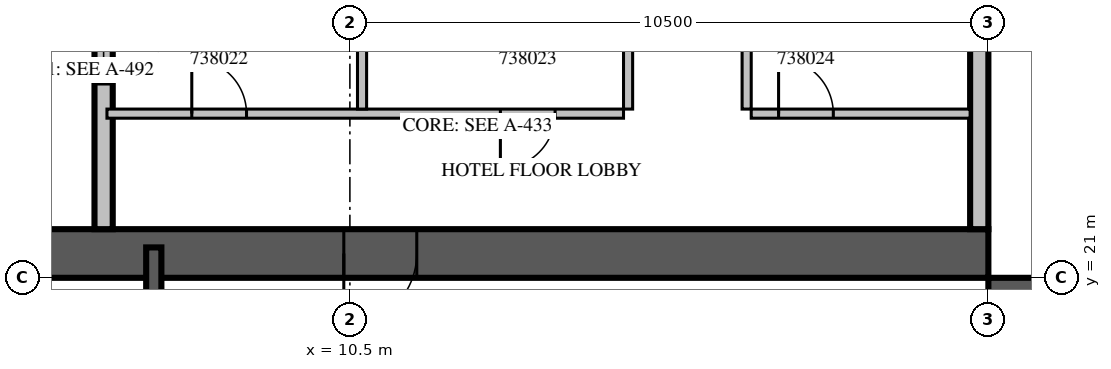
"""IFC4 building model, lengths in metres.
Left out: names, types, materials, properties, quantities, classifications, styles, units other than length and angle.
Written with IfcOpenShell. Run it as: python <this file> out.ifc"""

import sys

from ifc_helpers import new_model, si_unit, direction, frame, frame_2d, origin, place, context, subcontext, project, spatial, rectangle, extrude, source, transform, mapped, element, fill, save


model = new_model("IFC4")
c1 = context("Model", 3, precision=1e-05, world=origin(), true_north=direction((0.0, 1.0)))
c2 = subcontext(c1, "Body", "Model", "MODEL_VIEW")
j1 = project(units=[si_unit("LENGTHUNIT", "METRE"), si_unit("PLANEANGLEUNIT", "RADIAN")], contexts=[c1])
p1 = place(None, origin())
s1 = spatial("IfcSite", under=j1, at=p1, CompositionType="ELEMENT")
p2 = place(p1, origin())
s2 = spatial("IfcBuilding", under=s1, at=p2, CompositionType="ELEMENT")
p3 = place(p2, frame((0.0, 0.0, 177.8)))
s3 = spatial("IfcBuildingStorey", under=s2, at=p3, CompositionType="ELEMENT", Elevation=177.8)
p4 = place(p3, frame((21.4, 4.2, 0.0), z_axis=(0.0, 0.0, 1.0), x_axis=(0.0, 1.0, 0.0)))
e1 = element("IfcWall", 1, at=p4, inside=s3, PredefinedType="SHEAR", context=c2, shape_type="SweptSolid", body=[
    extrude(rectangle(XDim=16.8, YDim=0.8, at=frame_2d((8.4, 0.0))), origin(), (0.0, 0.0, 1.0), 3.8),
])
p5 = place(p4, frame((4.2, 0.0, 0.0)))
e2 = element("IfcOpeningElement", 2, at=p5, cuts=e1, PredefinedType="OPENING", context=c2, shape_type="SweptSolid", body=[
    extrude(rectangle(XDim=2.2, YDim=2.1, at=frame_2d((1.1, 1.05))), frame((0.0, 0.41, 0.0), z_axis=(0.0, -1.0, 0.0), x_axis=(1.0, 0.0, 0.0)), (0.0, 0.0, 1.0), 0.82),
])
m1 = source(origin(), c2, "Body", "SweptSolid", [
    extrude(rectangle(XDim=1.2, YDim=2.1, at=frame_2d((0.6, 1.05))), frame((0.0, 0.41, 0.0), z_axis=(0.0, -1.0, 0.0), x_axis=(1.0, 0.0, 0.0)), (0.0, 0.0, 1.0), 0.82),
])
p6 = place(p4, frame((14.7, 0.0, 0.0)))
e3 = element("IfcOpeningElement", 3, at=p6, cuts=e1, PredefinedType="OPENING", context=c2, shape_type="MappedRepresentation", body=[
    mapped(m1, transform((0.0, 0.0, 0.0), scale=1.0)),
])
m2 = source(origin(), c2, "Body", "SweptSolid", [
    extrude(rectangle(XDim=16.8, YDim=0.8, at=frame_2d((8.4, 0.0))), origin(), (0.0, 0.0, 1.0), 3.8),
])
p7 = place(p3, frame((4.2, 21.4, 0.0), z_axis=(0.0, 0.0, 1.0), x_axis=(1.0, 0.0, 0.0)))
e4 = element("IfcWall", 4, at=p7, inside=s3, PredefinedType="SHEAR", context=c2, shape_type="MappedRepresentation", body=[
    mapped(m2, transform((0.0, 0.0, 0.0), scale=1.0)),
])
p8 = place(p7, frame((6.2, 0.0, 0.0)))
e5 = element("IfcOpeningElement", 5, at=p8, cuts=e4, PredefinedType="OPENING", context=c2, shape_type="SweptSolid", body=[
    extrude(rectangle(XDim=1.2, YDim=2.1, at=frame_2d((0.6, 1.05))), frame((0.0, 0.41, 0.0), z_axis=(0.0, -1.0, 0.0), x_axis=(1.0, 0.0, 0.0)), (0.0, 0.0, 1.0), 0.82),
])
m3 = source(origin(), c2, "Body", "SweptSolid", [
    extrude(rectangle(XDim=7.15, YDim=0.3, at=frame_2d((3.575, 0.0))), origin(), (0.0, 0.0, 1.0), 3.4),
])
p9 = place(p3, frame((20.85, 21.8, 0.0), z_axis=(0.0, 0.0, 1.0), x_axis=(0.0, 1.0, 0.0)))
e6 = element("IfcWall", 6, at=p9, inside=s3, PredefinedType="STANDARD", context=c2, shape_type="MappedRepresentation", body=[
    mapped(m3, transform((0.0, 0.0, 0.0), scale=1.0)),
])
m4 = source(origin(), c2, "Body", "SweptSolid", [
    extrude(rectangle(XDim=3.0, YDim=2.3, at=frame_2d((1.5, 1.15))), frame((0.0, 0.16, 0.0), z_axis=(0.0, -1.0, 0.0), x_axis=(1.0, 0.0, 0.0)), (0.0, 0.0, 1.0), 0.32),
])
p10 = place(p9, frame((4.0, 0.0, 0.6)))
e7 = element("IfcOpeningElement", 7, at=p10, cuts=e6, PredefinedType="OPENING", context=c2, shape_type="MappedRepresentation", body=[
    mapped(m4, transform((0.0, 0.0, 0.0), scale=1.0)),
])
p11 = place(p3, frame((6.45, 38.4, 0.0), z_axis=(0.0, 0.0, 1.0), x_axis=(0.0, -1.0, 0.0)))
e8 = element("IfcWall", 8, at=p11, inside=s3, PredefinedType="STANDARD", context=c2, shape_type="SweptSolid", body=[
    extrude(rectangle(XDim=16.6, YDim=0.3, at=frame_2d((8.3, 0.0))), origin(), (0.0, 0.0, 1.0), 3.4),
])
m5 = source(origin(), c2, "Body", "SweptSolid", [
    extrude(rectangle(XDim=1.8, YDim=2.3, at=frame_2d((0.9, 1.15))), frame((0.0, 0.16, 0.0), z_axis=(0.0, -1.0, 0.0), x_axis=(1.0, 0.0, 0.0)), (0.0, 0.0, 1.0), 0.32),
])
p12 = place(p11, frame((1.15, 0.0, 0.6)))
e9 = element("IfcOpeningElement", 9, at=p12, cuts=e8, PredefinedType="OPENING", context=c2, shape_type="MappedRepresentation", body=[
    mapped(m5, transform((0.0, 0.0, 0.0), scale=1.0)),
])
p13 = place(p11, frame((5.162, 0.0, 0.6)))
e10 = element("IfcOpeningElement", 10, at=p13, cuts=e8, PredefinedType="OPENING", context=c2, shape_type="MappedRepresentation", body=[
    mapped(m5, transform((0.0, 0.0, 0.0), scale=1.0)),
])
p14 = place(p11, frame((9.438, 0.0, 0.6)))
e11 = element("IfcOpeningElement", 11, at=p14, cuts=e8, PredefinedType="OPENING", context=c2, shape_type="MappedRepresentation", body=[
    mapped(m5, transform((0.0, 0.0, 0.0), scale=1.0)),
])
m6 = source(origin(), c2, "Body", "SweptSolid", [
    extrude(rectangle(XDim=1.2, YDim=2.3, at=frame_2d((0.6, 1.15))), frame((0.0, 0.16, 0.0), z_axis=(0.0, -1.0, 0.0), x_axis=(1.0, 0.0, 0.0)), (0.0, 0.0, 1.0), 0.32),
])
p15 = place(p11, frame((13.012, 0.0, 0.6)))
e12 = element("IfcOpeningElement", 12, at=p15, cuts=e8, PredefinedType="OPENING", context=c2, shape_type="MappedRepresentation", body=[
    mapped(m6, transform((0.0, 0.0, 0.0), scale=1.0)),
])
p16 = place(p3, frame((7.275, 14.9, 0.0), z_axis=(0.0, 0.0, 1.0), x_axis=(0.0, 1.0, 0.0)))
e13 = element("IfcWall", 13, at=p16, inside=s3, PredefinedType="SOLIDWALL", context=c2, shape_type="SweptSolid", body=[
    extrude(rectangle(XDim=6.6, YDim=0.25, at=frame_2d((3.3, 0.0))), origin(), (0.0, 0.0, 1.0), 3.4),
])
m7 = source(origin(), c2, "Body", "SweptSolid", [
    extrude(rectangle(XDim=1.1, YDim=2.1, at=frame_2d((0.55, 1.05))), frame((0.0, 0.135, 0.0), z_axis=(0.0, -1.0, 0.0), x_axis=(1.0, 0.0, 0.0)), (0.0, 0.0, 1.0), 0.27),
])
p17 = place(p16, frame((0.15, 0.0, 0.0)))
e14 = element("IfcOpeningElement", 14, at=p17, cuts=e13, PredefinedType="OPENING", context=c2, shape_type="MappedRepresentation", body=[
    mapped(m7, transform((0.0, 0.0, 0.0), scale=1.0)),
])
p18 = place(p3, frame((6.505, 23.7, 0.0), z_axis=(0.0, 0.0, 1.0), x_axis=(1.0, 0.0, 0.0)))
e15 = element("IfcWall", 15, at=p18, inside=s3, PredefinedType="PARTITIONING", context=c2, shape_type="SweptSolid", body=[
    extrude(rectangle(XDim=8.495, YDim=0.15, at=frame_2d((4.247, 0.0))), origin(), (0.0, 0.0, 1.0), 3.4),
])
m8 = source(origin(), c2, "Body", "SweptSolid", [
    extrude(rectangle(XDim=0.9, YDim=2.1, at=frame_2d((0.45, 1.05))), frame((0.0, 0.085, 0.0), z_axis=(0.0, -1.0, 0.0), x_axis=(1.0, 0.0, 0.0)), (0.0, 0.0, 1.0), 0.17),
])
p19 = place(p18, frame((1.395, 0.0, 0.0)))
e16 = element("IfcOpeningElement", 16, at=p19, cuts=e15, PredefinedType="OPENING", context=c2, shape_type="MappedRepresentation", body=[
    mapped(m8, transform((0.0, 0.0, 0.0), scale=1.0)),
])
p20 = place(p18, frame((6.47, 0.0, 0.0)))
e17 = element("IfcOpeningElement", 17, at=p20, cuts=e15, PredefinedType="OPENING", context=c2, shape_type="MappedRepresentation", body=[
    mapped(m8, transform((0.0, 0.0, 0.0), scale=1.0)),
])
m9 = source(origin(), c2, "Body", "SweptSolid", [
    extrude(rectangle(XDim=3.6, YDim=0.15, at=frame_2d((1.8, 0.0))), origin(), (0.0, 0.0, 1.0), 3.4),
])
p21 = place(p3, frame((17.1, 23.7, 0.0), z_axis=(0.0, 0.0, 1.0), x_axis=(1.0, 0.0, 0.0)))
e18 = element("IfcWall", 18, at=p21, inside=s3, PredefinedType="PARTITIONING", context=c2, shape_type="MappedRepresentation", body=[
    mapped(m9, transform((0.0, 0.0, 0.0), scale=1.0)),
])
p22 = place(p21, frame((0.45, 0.0, 0.0)))
e19 = element("IfcOpeningElement", 19, at=p22, cuts=e18, PredefinedType="OPENING", context=c2, shape_type="MappedRepresentation", body=[
    mapped(m8, transform((0.0, 0.0, 0.0), scale=1.0)),
])
p23 = place(p3, frame((10.7, 23.775, 0.0), z_axis=(0.0, 0.0, 1.0), x_axis=(0.0, 1.0, 0.0)))
e20 = element("IfcWall", 20, at=p23, inside=s3, PredefinedType="PARTITIONING", context=c2, shape_type="SweptSolid", body=[
    extrude(rectangle(XDim=5.176, YDim=0.15, at=frame_2d((2.588, 0.0))), origin(), (0.0, 0.0, 1.0), 3.4),
])
m10 = source(origin(), c2, "Body", "SweptSolid", [
    extrude(rectangle(XDim=5.55, YDim=0.15, at=frame_2d((2.775, 0.0))), origin(), (0.0, 0.0, 1.0), 3.4),
])
for number, where, z_axis, x_axis in (
    (21, (15.075, 23.775, 0.0), (0.0, 0.0, 1.0), (0.0, 1.0, 0.0)),
    (22, (17.025, 29.325, 0.0), (0.0, 0.0, 1.0), (0.0, -1.0, 0.0)),
):
    element("IfcWall", number, at=place(p3, frame(where, z_axis=z_axis, x_axis=x_axis)), inside=s3, PredefinedType="PARTITIONING", context=c2, shape_type="MappedRepresentation", body=[
        mapped(m10, transform((0.0, 0.0, 0.0), scale=1.0)),
    ])
m11 = source(origin(), c2, "Body", "SweptSolid", [
    extrude(rectangle(XDim=1.2, YDim=2.3, at=frame_2d((0.6, 1.15))), frame((0.0, 0.03, 0.0), z_axis=(0.0, -1.0, 0.0), x_axis=(1.0, 0.0, 0.0)), (0.0, 0.0, 1.0), 0.06),
])
p24 = place(p15, origin())
e23 = element("IfcWindow", 23, at=p24, inside=s3, PartitioningType="SINGLE_PANEL", PredefinedType="WINDOW", context=c2, shape_type="MappedRepresentation", body=[
    mapped(m11, transform((0.0, 0.0, 0.0), scale=1.0)),
])
fill(e12, e23)
m12 = source(origin(), c2, "Body", "SweptSolid", [
    extrude(rectangle(XDim=1.2, YDim=2.1, at=frame_2d((0.6, 1.05))), frame((0.0, 0.025, 0.0), z_axis=(0.0, -1.0, 0.0), x_axis=(1.0, 0.0, 0.0)), (0.0, 0.0, 1.0), 0.05),
])
p25 = place(p8, origin())
e24 = element("IfcDoor", 24, at=p25, inside=s3, OperationType="SINGLE_SWING_RIGHT", PredefinedType="DOOR", context=c2, shape_type="MappedRepresentation", body=[
    mapped(m12, transform((0.0, 0.0, 0.0), scale=1.0)),
])
fill(e5, e24)
m13 = source(origin(), c2, "Body", "SweptSolid", [
    extrude(rectangle(XDim=0.9, YDim=2.1, at=frame_2d((0.45, 1.05))), frame((0.0, 0.025, 0.0), z_axis=(0.0, -1.0, 0.0), x_axis=(1.0, 0.0, 0.0)), (0.0, 0.0, 1.0), 0.05),
])
p26 = place(p19, origin())
e25 = element("IfcDoor", 25, at=p26, inside=s3, OperationType="SINGLE_SWING_LEFT", PredefinedType="DOOR", context=c2, shape_type="MappedRepresentation", body=[
    mapped(m13, transform((0.0, 0.0, 0.0), scale=1.0)),
])
fill(e16, e25)
p27 = place(p20, origin())
e26 = element("IfcDoor", 26, at=p27, inside=s3, OperationType="SINGLE_SWING_RIGHT", PredefinedType="DOOR", context=c2, shape_type="MappedRepresentation", body=[
    mapped(m13, transform((0.0, 0.0, 0.0), scale=1.0)),
])
fill(e17, e26)
p28 = place(p22, origin())
e27 = element("IfcDoor", 27, at=p28, inside=s3, OperationType="SINGLE_SWING_LEFT", PredefinedType="DOOR", context=c2, shape_type="MappedRepresentation", body=[
    mapped(m13, transform((0.0, 0.0, 0.0), scale=1.0)),
])
fill(e19, e27)
save(model, sys.argv[1])
